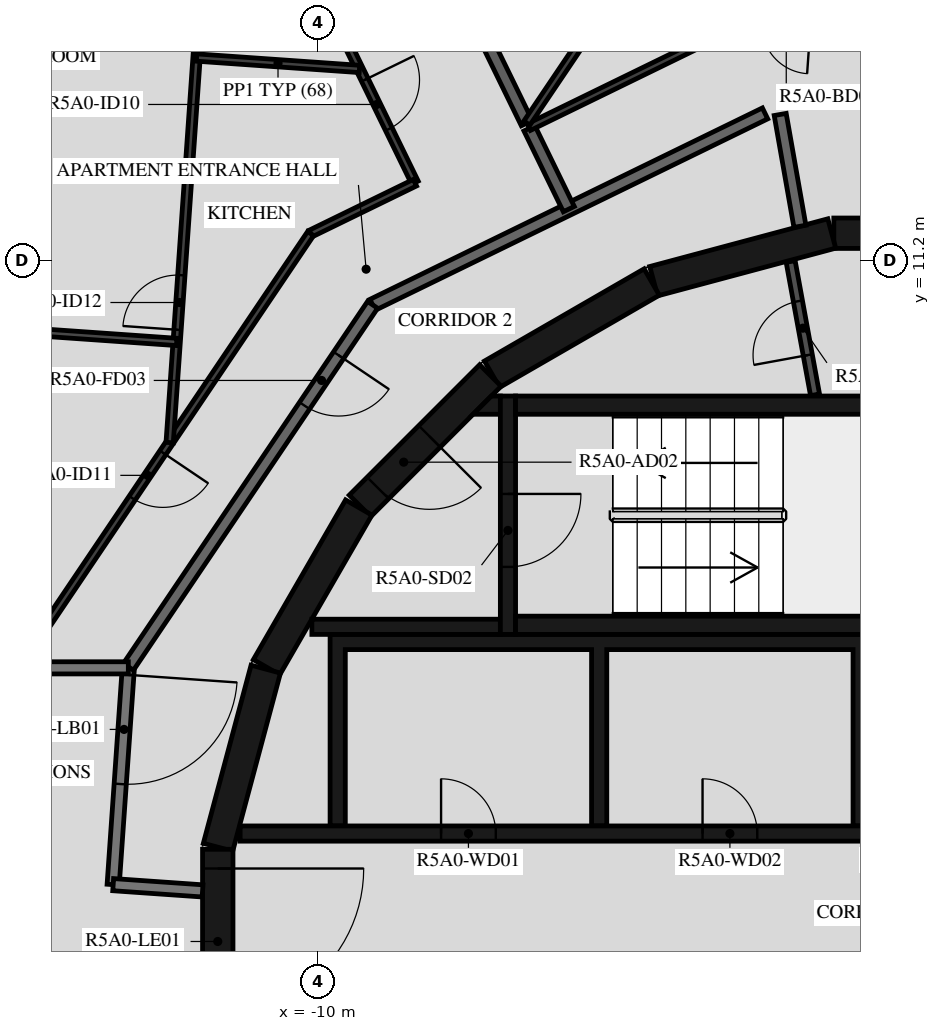
"""IFC4 building model, lengths in metres.
Left out: names, types, materials, properties, quantities, classifications, styles, units other than length and angle.
Written with IfcOpenShell. Run it as: python <this file> out.ifc"""

import sys

from ifc_helpers import new_model, si_unit, direction, frame, frame_2d, origin, place, context, subcontext, project, spatial, polyline, rectangle, outline, extrude, element, fill, save


model = new_model("IFC4")
c1 = context("Model", 3, precision=1e-05, world=origin(), true_north=direction((0.0, 1.0)))
c2 = subcontext(c1, "Body", "Model", "MODEL_VIEW")
j1 = project(units=[si_unit("LENGTHUNIT", "METRE"), si_unit("PLANEANGLEUNIT", "RADIAN")], contexts=[c1])
p1 = place(None, origin())
s1 = spatial("IfcSite", under=j1, at=p1, CompositionType="ELEMENT")
p2 = place(p1, origin())
s2 = spatial("IfcBuilding", under=s1, at=p2, CompositionType="ELEMENT")
p3 = place(p2, frame((0.0, 0.0, 188.4)))
s3 = spatial("IfcBuildingStorey", under=s2, at=p3, CompositionType="ELEMENT", Elevation=188.4)
for number, where, z_axis, x_axis in (
    (1, (1.516, 11.647, 0.0), (0.0, 0.0, 1.0), (-1.0, 0.0, 0.0)),
    (2, (-1.55, 11.643, 0.0), (0.0, 0.0, 1.0), (-0.966, -0.259, 0.0)),
    (3, (-4.51, 10.845, 0.0), (0.0, 0.0, 1.0), (-0.866, -0.5, 0.0)),
):
    element("IfcWall", number, at=place(p3, frame(where, z_axis=z_axis, x_axis=x_axis)), inside=s3, PredefinedType="SHEAR", context=c2, shape_type="SweptSolid", body=[
        extrude(rectangle(XDim=3.033, YDim=0.5, at=frame_2d((1.516, 0.0))), origin(), (0.0, 0.0, 1.0), 3.12),
    ])
p4 = place(p3, frame((-7.164, 9.308, 0.0), z_axis=(0.0, 0.0, 1.0), x_axis=(-0.707106781187, -0.707106781187, 0.0)))
e4 = element("IfcWall", 4, at=p4, inside=s3, PredefinedType="SHEAR", context=c2, shape_type="SweptSolid", body=[
    extrude(rectangle(XDim=3.032, YDim=0.5, at=frame_2d((1.516, 0.0))), origin(), (0.0, 0.0, 1.0), 3.12),
])
p5 = place(p4, frame((1.416, 0.0, 0.0)))
e5 = element("IfcOpeningElement", 5, at=p5, cuts=e4, PredefinedType="OPENING", context=c2, shape_type="SweptSolid", body=[
    extrude(rectangle(XDim=1.2, YDim=2.1, at=frame_2d((0.6, 1.05))), frame((0.0, 0.26, 0.0), z_axis=(0.0, -1.0, 0.0), x_axis=(1.0, 0.0, 0.0)), (0.0, 0.0, 1.0), 0.52),
])
for number, where, z_axis, x_axis in (
    (6, (-9.329, 7.137, 0.0), (0.0, 0.0, 1.0), (-0.5, -0.866, 0.0)),
    (7, (-10.858, 4.479, 0.0), (0.0, 0.0, 1.0), (-0.259, -0.966, 0.0)),
):
    element("IfcWall", number, at=place(p3, frame(where, z_axis=z_axis, x_axis=x_axis)), inside=s3, PredefinedType="SHEAR", context=c2, shape_type="SweptSolid", body=[
        extrude(rectangle(XDim=3.033, YDim=0.5, at=frame_2d((1.516, 0.0))), origin(), (0.0, 0.0, 1.0), 3.12),
    ])
p6 = place(p3, frame((-11.647, 1.516, 0.0), z_axis=(0.0, 0.0, 1.0), x_axis=(0.0, -1.0, 0.0)))
e8 = element("IfcWall", 8, at=p6, inside=s3, PredefinedType="SHEAR", context=c2, shape_type="SweptSolid", body=[
    extrude(rectangle(XDim=3.033, YDim=0.5, at=frame_2d((1.516, 0.0))), origin(), (0.0, 0.0, 1.0), 3.12),
])
p7 = place(p6, frame((0.316, 0.0, 0.0)))
e9 = element("IfcOpeningElement", 9, at=p7, cuts=e8, PredefinedType="OPENING", context=c2, shape_type="SweptSolid", body=[
    extrude(rectangle(XDim=2.4, YDim=2.1, at=frame_2d((1.2, 1.05))), frame((0.0, 0.26, 0.0), z_axis=(0.0, -1.0, 0.0), x_axis=(1.0, 0.0, 0.0)), (0.0, 0.0, 1.0), 0.52),
])
for number, where, z_axis, x_axis in (
    (10, (-6.75, 5.2, 0.0), (0.0, 0.0, 1.0), (1.0, 0.0, 0.0)),
    (11, (-6.75, 8.82, 0.0), (0.0, 0.0, 1.0), (1.0, 0.0, 0.0)),
):
    element("IfcWall", number, at=place(p3, frame(where, z_axis=z_axis, x_axis=x_axis)), inside=s3, PredefinedType="SHEAR", context=c2, shape_type="SweptSolid", body=[
        extrude(rectangle(XDim=6.75, YDim=0.3, at=frame_2d((3.375, 0.0))), origin(), (0.0, 0.0, 1.0), 3.12),
    ])
p8 = place(p3, frame((-6.875, 8.97, 0.0), z_axis=(0.0, 0.0, 1.0), x_axis=(0.0, -1.0, 0.0)))
e12 = element("IfcWall", 12, at=p8, inside=s3, PredefinedType="SHEAR", context=c2, shape_type="SweptSolid", body=[
    extrude(rectangle(XDim=3.92, YDim=0.25, at=frame_2d((1.96, 0.0))), origin(), (0.0, 0.0, 1.0), 3.12),
])
p9 = place(p8, frame((1.61, 0.0, 0.0)))
e13 = element("IfcOpeningElement", 13, at=p9, cuts=e12, PredefinedType="OPENING", context=c2, shape_type="SweptSolid", body=[
    extrude(rectangle(XDim=1.2, YDim=2.1, at=frame_2d((0.6, 1.05))), frame((0.0, 0.135, 0.0), z_axis=(0.0, -1.0, 0.0), x_axis=(1.0, 0.0, 0.0)), (0.0, 0.0, 1.0), 0.27),
])
p10 = place(p3, frame((-7.0, 5.175, 0.0), z_axis=(0.0, 0.0, 1.0), x_axis=(-1.0, 0.0, 0.0)))
e14 = element("IfcWall", 14, at=p10, inside=s3, PredefinedType="SHEAR", context=c2, shape_type="SweptSolid", body=[
    extrude(rectangle(XDim=3.1, YDim=0.25, at=frame_2d((1.55, 0.0))), origin(), (0.0, 0.0, 1.0), 3.12),
])
p11 = place(p3, origin())
e15 = element("IfcWall", 15, at=p11, inside=s3, PredefinedType="SHEAR", context=c2, shape_type="SweptSolid", body=[
    extrude(outline(polyline([(-7.148, 8.97), (-7.0, 8.97), (-7.0, 8.67), (-7.448, 8.67), (-7.148, 8.97)])), origin(), (0.0, 0.0, 1.0), 3.12),
])
p12 = place(p3, origin())
e16 = element("IfcWall", 16, at=p12, inside=s3, PredefinedType="SHEAR", context=c2, shape_type="SweptSolid", body=[
    extrude(outline(polyline([(-9.55, 4.8), (-5.5, 4.8), (-5.5, 1.9), (-5.25, 1.9), (-5.25, 4.8), (-1.2, 4.8), (-1.2, 1.9), (-0.95, 1.9), (-0.95, 4.8), (0.95, 4.8), (0.95, 1.9), (1.2, 1.9), (1.2, 4.8), (3.1, 4.8), (3.1, 1.9), (3.35, 1.9), (3.35, 4.8), (5.25, 4.8), (5.25, 1.9), (5.5, 1.9), (5.5, 4.8), (7.4, 4.8), (7.4, 1.9), (7.65, 1.9), (7.65, 4.8), (9.55, 4.8), (9.55, 1.9), (9.8, 1.9), (9.8, 4.8), (9.8, 5.05), (-9.8, 5.05), (-9.8, 4.8), (-9.8, 1.9), (-9.55, 1.9), (-9.55, 4.8)])), origin(), (0.0, 0.0, 1.0), 3.12),
])
p13 = place(p3, frame((-11.28, 1.775, 0.0), z_axis=(0.0, 0.0, 1.0), x_axis=(1.0, 0.0, 0.0)))
e17 = element("IfcWall", 17, at=p13, inside=s3, PredefinedType="SHEAR", context=c2, shape_type="SweptSolid", body=[
    extrude(rectangle(XDim=14.38, YDim=0.25, at=frame_2d((7.19, 0.0))), origin(), (0.0, 0.0, 1.0), 3.12),
])
p14 = place(p13, frame((10.73, 0.0, 0.0)))
e18 = element("IfcOpeningElement", 18, at=p14, cuts=e17, PredefinedType="OPENING", context=c2, shape_type="SweptSolid", body=[
    extrude(rectangle(XDim=1.1, YDim=2.1, at=frame_2d((0.55, 1.05))), frame((0.0, 0.135, 0.0), z_axis=(0.0, -1.0, 0.0), x_axis=(1.0, 0.0, 0.0)), (0.0, 0.0, 1.0), 0.27),
])
p15 = place(p13, frame((12.88, 0.0, 0.0)))
e19 = element("IfcOpeningElement", 19, at=p15, cuts=e17, PredefinedType="OPENING", context=c2, shape_type="SweptSolid", body=[
    extrude(rectangle(XDim=1.1, YDim=2.1, at=frame_2d((0.55, 1.05))), frame((0.0, 0.135, 0.0), z_axis=(0.0, -1.0, 0.0), x_axis=(1.0, 0.0, 0.0)), (0.0, 0.0, 1.0), 0.27),
])
p16 = place(p13, frame((3.305, 0.0, 0.0)))
e20 = element("IfcOpeningElement", 20, at=p16, cuts=e17, PredefinedType="OPENING", context=c2, shape_type="SweptSolid", body=[
    extrude(rectangle(XDim=0.9, YDim=2.1, at=frame_2d((0.45, 1.05))), frame((0.0, 0.135, 0.0), z_axis=(0.0, -1.0, 0.0), x_axis=(1.0, 0.0, 0.0)), (0.0, 0.0, 1.0), 0.27),
])
p17 = place(p13, frame((7.605, 0.0, 0.0)))
e21 = element("IfcOpeningElement", 21, at=p17, cuts=e17, PredefinedType="OPENING", context=c2, shape_type="SweptSolid", body=[
    extrude(rectangle(XDim=0.9, YDim=2.1, at=frame_2d((0.45, 1.05))), frame((0.0, 0.135, 0.0), z_axis=(0.0, -1.0, 0.0), x_axis=(1.0, 0.0, 0.0)), (0.0, 0.0, 1.0), 0.27),
])
p18 = place(p3, frame((-1.825, 8.99, 0.0), z_axis=(0.0, 0.0, 1.0), x_axis=(-0.179955206115, 0.983674805915, 0.0)))
e22 = element("IfcWall", 22, at=p18, inside=s3, PredefinedType="PARTITIONING", context=c2, shape_type="SweptSolid", body=[
    extrude(rectangle(XDim=2.229, YDim=0.15, at=frame_2d((1.115, 0.0))), origin(), (0.0, 0.0, 1.0), 3.12),
])
p19 = place(p18, frame((0.665, 0.0, 0.0)))
e23 = element("IfcOpeningElement", 23, at=p19, cuts=e22, PredefinedType="OPENING", context=c2, shape_type="SweptSolid", body=[
    extrude(rectangle(XDim=0.9, YDim=2.1, at=frame_2d((0.45, 1.05))), frame((0.0, 0.085, 0.0), z_axis=(0.0, -1.0, 0.0), x_axis=(1.0, 0.0, 0.0)), (0.0, 0.0, 1.0), 0.17),
])
p20 = place(p3, frame((-13.118, 4.5, 0.0), z_axis=(0.0, 0.0, 1.0), x_axis=(-0.069746872611, -0.99756472159, 0.0)))
e24 = element("IfcWall", 24, at=p20, inside=s3, PredefinedType="STANDARD", context=c2, shape_type="SweptSolid", body=[
    extrude(rectangle(XDim=3.574, YDim=0.2, at=frame_2d((1.787, 0.0))), origin(), (0.0, 0.0, 1.0), 3.12),
])
p21 = place(p20, frame((0.115, 0.0, 0.0)))
e25 = element("IfcOpeningElement", 25, at=p21, cuts=e24, PredefinedType="OPENING", context=c2, shape_type="SweptSolid", body=[
    extrude(rectangle(XDim=1.8, YDim=2.1, at=frame_2d((0.9, 1.05))), frame((0.0, 0.11, 0.0), z_axis=(0.0, -1.0, 0.0), x_axis=(1.0, 0.0, 0.0)), (0.0, 0.0, 1.0), 0.22),
])
p22 = place(p3, frame((-13.367, 0.935, 0.0), z_axis=(0.0, 0.0, 1.0), x_axis=(0.997553656289, -0.069904955655, 0.0)))
e26 = element("IfcWall", 26, at=p22, inside=s3, PredefinedType="STANDARD", context=c2, shape_type="SweptSolid", body=[
    extrude(rectangle(XDim=1.474, YDim=0.2, at=frame_2d((0.737, 0.0))), origin(), (0.0, 0.0, 1.0), 3.12),
])
p23 = place(p3, frame((-2.074, 11.761, 0.0), z_axis=(0.0, 0.0, 1.0), x_axis=(-0.173740587112, 0.984791454263, 0.0)))
e27 = element("IfcWall", 27, at=p23, inside=s3, PredefinedType="STANDARD", context=c2, shape_type="SweptSolid", body=[
    extrude(rectangle(XDim=1.867, YDim=0.2, at=frame_2d((0.934, 0.0))), origin(), (0.0, 0.0, 1.0), 3.12),
])
p24 = place(p3, frame((-2.647, 13.618, 0.0), z_axis=(0.0, 0.0, 1.0), x_axis=(-0.898796543751, -0.438366026218, 0.0)))
e28 = element("IfcWall", 28, at=p24, inside=s3, PredefinedType="STANDARD", context=c2, shape_type="SweptSolid", body=[
    extrude(rectangle(XDim=7.181, YDim=0.2, at=frame_2d((3.591, 0.0))), origin(), (0.0, 0.0, 1.0), 3.12),
])
p25 = place(p3, frame((-9.101, 10.47, 0.0), z_axis=(0.0, 0.0, 1.0), x_axis=(-0.559195469534, -0.829035841718, 0.0)))
e29 = element("IfcWall", 29, at=p25, inside=s3, PredefinedType="STANDARD", context=c2, shape_type="SweptSolid", body=[
    extrude(rectangle(XDim=7.181, YDim=0.2, at=frame_2d((3.591, 0.0))), origin(), (0.0, 0.0, 1.0), 3.12),
])
p26 = place(p25, frame((1.0, 0.0, 0.0)))
e30 = element("IfcOpeningElement", 30, at=p26, cuts=e29, PredefinedType="OPENING", context=c2, shape_type="SweptSolid", body=[
    extrude(rectangle(XDim=1.0, YDim=2.1, at=frame_2d((0.5, 1.05))), frame((0.0, 0.11, 0.0), z_axis=(0.0, -1.0, 0.0), x_axis=(1.0, 0.0, 0.0)), (0.0, 0.0, 1.0), 0.22),
])
p27 = place(p3, frame((-13.118, 4.5, 0.0), z_axis=(0.0, 0.0, 1.0), x_axis=(-1.0, 0.0, 0.0)))
e31 = element("IfcWall", 31, at=p27, inside=s3, PredefinedType="STANDARD", context=c2, shape_type="SweptSolid", body=[
    extrude(rectangle(XDim=4.782, YDim=0.2, at=frame_2d((2.391, 0.0))), origin(), (0.0, 0.0, 1.0), 3.12),
])
p28 = place(p3, frame((-6.522, 13.373, 0.0), z_axis=(0.0, 0.0, 1.0), x_axis=(0.438277270821, -0.8988398266, 0.0)))
e32 = element("IfcWall", 32, at=p28, inside=s3, PredefinedType="STANDARD", context=c2, shape_type="SweptSolid", body=[
    extrude(rectangle(XDim=1.479, YDim=0.2, at=frame_2d((0.74, 0.0))), origin(), (0.0, 0.0, 1.0), 3.12),
])
p29 = place(p3, frame((-8.219, 16.851, 0.0), z_axis=(0.0, 0.0, 1.0), x_axis=(0.438291091101, -0.898833087654, 0.0)))
e33 = element("IfcWall", 33, at=p29, inside=s3, PredefinedType="STANDARD", context=c2, shape_type="SweptSolid", body=[
    extrude(rectangle(XDim=3.774, YDim=0.2, at=frame_2d((1.887, 0.0))), origin(), (0.0, 0.0, 1.0), 3.12),
])
p30 = place(p3, frame((5.022, 14.585, 0.0), z_axis=(0.0, 0.0, 1.0), x_axis=(-0.997565118395, 0.069741197017, 0.0)))
e34 = element("IfcWall", 34, at=p30, inside=s3, PredefinedType="PARTITIONING", context=c2, shape_type="SweptSolid", body=[
    extrude(rectangle(XDim=7.985, YDim=0.12, at=frame_2d((3.993, 0.0))), origin(), (0.0, 0.0, 1.0), 3.12),
])
p31 = place(p30, frame((2.875, 0.0, 0.0)))
e35 = element("IfcOpeningElement", 35, at=p31, cuts=e34, PredefinedType="OPENING", context=c2, shape_type="SweptSolid", body=[
    extrude(rectangle(XDim=0.9, YDim=2.1, at=frame_2d((0.45, 1.05))), frame((0.0, 0.07, 0.0), z_axis=(0.0, -1.0, 0.0), x_axis=(1.0, 0.0, 0.0)), (0.0, 0.0, 1.0), 0.14),
])
p32 = place(p30, frame((6.938, 0.0, 0.0)))
e36 = element("IfcOpeningElement", 36, at=p32, cuts=e34, PredefinedType="OPENING", context=c2, shape_type="SweptSolid", body=[
    extrude(rectangle(XDim=0.8, YDim=2.1, at=frame_2d((0.4, 1.05))), frame((0.0, 0.07, 0.0), z_axis=(0.0, -1.0, 0.0), x_axis=(1.0, 0.0, 0.0)), (0.0, 0.0, 1.0), 0.14),
])
p33 = place(p3, frame((-2.943, 15.142, 0.0), z_axis=(0.0, 0.0, 1.0), x_axis=(-0.89881075705, -0.438336883014, 0.0)))
e37 = element("IfcWall", 37, at=p33, inside=s3, PredefinedType="PARTITIONING", context=c2, shape_type="SweptSolid", body=[
    extrude(rectangle(XDim=3.992, YDim=0.12, at=frame_2d((1.996, 0.0))), origin(), (0.0, 0.0, 1.0), 3.12),
])
p34 = place(p3, frame((-3.939, 17.35, 0.0), z_axis=(0.0, 0.0, 1.0), x_axis=(-0.559193216274, -0.829037361566, 0.0)))
e38 = element("IfcWall", 38, at=p34, inside=s3, PredefinedType="PARTITIONING", context=c2, shape_type="SweptSolid", body=[
    extrude(rectangle(XDim=4.694, YDim=0.12, at=frame_2d((2.347, 0.0))), origin(), (0.0, 0.0, 1.0), 3.12),
])
p35 = place(p3, frame((-10.5, 16.775, 0.0), z_axis=(0.0, 0.0, 1.0), x_axis=(0.438345136783, -0.898806731761, 0.0)))
e39 = element("IfcWall", 39, at=p35, inside=s3, PredefinedType="PARTITIONING", context=c2, shape_type="SweptSolid", body=[
    extrude(rectangle(XDim=4.78, YDim=0.12, at=frame_2d((2.39, 0.0))), origin(), (0.0, 0.0, 1.0), 3.12),
])
p36 = place(p35, frame((0.7, 0.0, 0.0)))
e40 = element("IfcOpeningElement", 40, at=p36, cuts=e39, PredefinedType="OPENING", context=c2, shape_type="SweptSolid", body=[
    extrude(rectangle(XDim=0.8, YDim=2.1, at=frame_2d((0.4, 1.05))), frame((0.0, 0.07, 0.0), z_axis=(0.0, -1.0, 0.0), x_axis=(1.0, 0.0, 0.0)), (0.0, 0.0, 1.0), 0.14),
])
p37 = place(p35, frame((2.899, 0.0, 0.0)))
e41 = element("IfcOpeningElement", 41, at=p37, cuts=e39, PredefinedType="OPENING", context=c2, shape_type="SweptSolid", body=[
    extrude(rectangle(XDim=0.9, YDim=2.1, at=frame_2d((0.45, 1.05))), frame((0.0, 0.07, 0.0), z_axis=(0.0, -1.0, 0.0), x_axis=(1.0, 0.0, 0.0)), (0.0, 0.0, 1.0), 0.14),
])
p38 = place(p3, frame((-8.405, 12.479, 0.0), z_axis=(0.0, 0.0, 1.0), x_axis=(-0.898784427692, -0.438390867307, 0.0)))
e42 = element("IfcWall", 42, at=p38, inside=s3, PredefinedType="PARTITIONING", context=c2, shape_type="SweptSolid", body=[
    extrude(rectangle(XDim=1.908, YDim=0.12, at=frame_2d((0.954, 0.0))), origin(), (0.0, 0.0, 1.0), 3.12),
])
p39 = place(p3, frame((-10.12, 11.642, 0.0), z_axis=(0.0, 0.0, 1.0), x_axis=(-0.55920080659, -0.829032241779, 0.0)))
e43 = element("IfcWall", 43, at=p39, inside=s3, PredefinedType="PARTITIONING", context=c2, shape_type="SweptSolid", body=[
    extrude(rectangle(XDim=7.985, YDim=0.12, at=frame_2d((3.992, 0.0))), origin(), (0.0, 0.0, 1.0), 3.12),
])
p40 = place(p39, frame((4.346, 0.0, 0.0)))
e44 = element("IfcOpeningElement", 44, at=p40, cuts=e43, PredefinedType="OPENING", context=c2, shape_type="SweptSolid", body=[
    extrude(rectangle(XDim=0.9, YDim=2.1, at=frame_2d((0.45, 1.05))), frame((0.0, 0.07, 0.0), z_axis=(0.0, -1.0, 0.0), x_axis=(1.0, 0.0, 0.0)), (0.0, 0.0, 1.0), 0.14),
])
p41 = place(p3, frame((-12.439, 8.204, 0.0), z_axis=(0.0, 0.0, 1.0), x_axis=(0.069750037523, 0.997564500303, 0.0)))
e45 = element("IfcWall", 45, at=p41, inside=s3, PredefinedType="PARTITIONING", context=c2, shape_type="SweptSolid", body=[
    extrude(rectangle(XDim=10.014, YDim=0.12, at=frame_2d((5.007, 0.0))), origin(), (0.0, 0.0, 1.0), 3.12),
])
p42 = place(p41, frame((1.859, 0.0, 0.0)))
e46 = element("IfcOpeningElement", 46, at=p42, cuts=e45, PredefinedType="OPENING", context=c2, shape_type="SweptSolid", body=[
    extrude(rectangle(XDim=0.9, YDim=2.1, at=frame_2d((0.45, 1.05))), frame((0.0, 0.07, 0.0), z_axis=(0.0, -1.0, 0.0), x_axis=(1.0, 0.0, 0.0)), (0.0, 0.0, 1.0), 0.14),
])
p43 = place(p3, frame((-11.996, 14.536, 0.0), z_axis=(0.0, 0.0, 1.0), x_axis=(0.997565991425, -0.069728708231, 0.0)))
e47 = element("IfcWall", 47, at=p43, inside=s3, PredefinedType="PARTITIONING", context=c2, shape_type="SweptSolid", body=[
    extrude(rectangle(XDim=2.686, YDim=0.12, at=frame_2d((1.343, 0.0))), origin(), (0.0, 0.0, 1.0), 3.12),
])
p44 = place(p3, frame((-17.51, 10.222, 0.0), z_axis=(0.0, 0.0, 1.0), x_axis=(0.997563184303, -0.069768856397, 0.0)))
e48 = element("IfcWall", 48, at=p44, inside=s3, PredefinedType="PARTITIONING", context=c2, shape_type="SweptSolid", body=[
    extrude(rectangle(XDim=5.2, YDim=0.12, at=frame_2d((2.6, 0.0))), origin(), (0.0, 0.0, 1.0), 2.73),
])
p45 = place(p9, origin())
e49 = element("IfcDoor", 49, at=p45, inside=s3, OperationType="SINGLE_SWING_LEFT", PredefinedType="DOOR", context=c2, shape_type="SweptSolid", body=[
    extrude(rectangle(XDim=1.2, YDim=2.1, at=frame_2d((0.6, 1.05))), frame((0.0, 0.025, 0.0), z_axis=(0.0, -1.0, 0.0), x_axis=(1.0, 0.0, 0.0)), (0.0, 0.0, 1.0), 0.05),
])
fill(e13, e49)
p46 = place(p5, origin())
e50 = element("IfcDoor", 50, at=p46, inside=s3, OperationType="SINGLE_SWING_RIGHT", PredefinedType="DOOR", context=c2, shape_type="SweptSolid", body=[
    extrude(rectangle(XDim=1.2, YDim=2.1, at=frame_2d((0.6, 1.05))), frame((0.0, 0.025, 0.0), z_axis=(0.0, -1.0, 0.0), x_axis=(1.0, 0.0, 0.0)), (0.0, 0.0, 1.0), 0.05),
])
fill(e5, e50)
p47 = place(p7, origin())
e51 = element("IfcDoor", 51, at=p47, inside=s3, OperationType="DOUBLE_DOOR_SINGLE_SWING", PredefinedType="DOOR", context=c2, shape_type="SweptSolid", body=[
    extrude(rectangle(XDim=2.4, YDim=2.1, at=frame_2d((1.2, 1.05))), frame((0.0, 0.025, 0.0), z_axis=(0.0, -1.0, 0.0), x_axis=(1.0, 0.0, 0.0)), (0.0, 0.0, 1.0), 0.05),
])
fill(e9, e51)
p48 = place(p16, origin())
e52 = element("IfcDoor", 52, at=p48, inside=s3, OperationType="SINGLE_SWING_LEFT", PredefinedType="DOOR", context=c2, shape_type="SweptSolid", body=[
    extrude(rectangle(XDim=0.9, YDim=2.1, at=frame_2d((0.45, 1.05))), frame((0.0, 0.025, 0.0), z_axis=(0.0, -1.0, 0.0), x_axis=(1.0, 0.0, 0.0)), (0.0, 0.0, 1.0), 0.05),
])
fill(e20, e52)
p49 = place(p17, origin())
e53 = element("IfcDoor", 53, at=p49, inside=s3, OperationType="SINGLE_SWING_RIGHT", PredefinedType="DOOR", context=c2, shape_type="SweptSolid", body=[
    extrude(rectangle(XDim=0.9, YDim=2.1, at=frame_2d((0.45, 1.05))), frame((0.0, 0.025, 0.0), z_axis=(0.0, -1.0, 0.0), x_axis=(1.0, 0.0, 0.0)), (0.0, 0.0, 1.0), 0.05),
])
fill(e21, e53)
p50 = place(p19, origin())
e54 = element("IfcDoor", 54, at=p50, inside=s3, OperationType="SINGLE_SWING_LEFT", PredefinedType="DOOR", context=c2, shape_type="SweptSolid", body=[
    extrude(rectangle(XDim=0.9, YDim=2.1, at=frame_2d((0.45, 1.05))), frame((0.0, 0.025, 0.0), z_axis=(0.0, -1.0, 0.0), x_axis=(1.0, 0.0, 0.0)), (0.0, 0.0, 1.0), 0.05),
])
fill(e23, e54)
p51 = place(p26, origin())
e55 = element("IfcDoor", 55, at=p51, inside=s3, OperationType="SINGLE_SWING_LEFT", PredefinedType="DOOR", context=c2, shape_type="SweptSolid", body=[
    extrude(rectangle(XDim=1.0, YDim=2.1, at=frame_2d((0.5, 1.05))), frame((0.0, 0.025, 0.0), z_axis=(0.0, -1.0, 0.0), x_axis=(1.0, 0.0, 0.0)), (0.0, 0.0, 1.0), 0.05),
])
fill(e30, e55)
p52 = place(p37, origin())
e56 = element("IfcDoor", 56, at=p52, inside=s3, OperationType="SINGLE_SWING_LEFT", PredefinedType="DOOR", context=c2, shape_type="SweptSolid", body=[
    extrude(rectangle(XDim=0.9, YDim=2.1, at=frame_2d((0.45, 1.05))), frame((0.0, 0.025, 0.0), z_axis=(0.0, -1.0, 0.0), x_axis=(1.0, 0.0, 0.0)), (0.0, 0.0, 1.0), 0.05),
])
fill(e41, e56)
p53 = place(p40, origin())
e57 = element("IfcDoor", 57, at=p53, inside=s3, OperationType="SINGLE_SWING_LEFT", PredefinedType="DOOR", context=c2, shape_type="SweptSolid", body=[
    extrude(rectangle(XDim=0.9, YDim=2.1, at=frame_2d((0.45, 1.05))), frame((0.0, 0.025, 0.0), z_axis=(0.0, -1.0, 0.0), x_axis=(1.0, 0.0, 0.0)), (0.0, 0.0, 1.0), 0.05),
])
fill(e44, e57)
p54 = place(p42, origin())
e58 = element("IfcDoor", 58, at=p54, inside=s3, OperationType="SINGLE_SWING_LEFT", PredefinedType="DOOR", context=c2, shape_type="SweptSolid", body=[
    extrude(rectangle(XDim=0.9, YDim=2.1, at=frame_2d((0.45, 1.05))), frame((0.0, 0.025, 0.0), z_axis=(0.0, -1.0, 0.0), x_axis=(1.0, 0.0, 0.0)), (0.0, 0.0, 1.0), 0.05),
])
fill(e46, e58)
p55 = place(p21, origin())
e59 = element("IfcDoor", 59, at=p55, inside=s3, OperationType="DOUBLE_DOOR_SINGLE_SWING", PredefinedType="DOOR", context=c2, shape_type="SweptSolid", body=[
    extrude(rectangle(XDim=1.8, YDim=2.1, at=frame_2d((0.9, 1.05))), frame((0.0, 0.025, 0.0), z_axis=(0.0, -1.0, 0.0), x_axis=(1.0, 0.0, 0.0)), (0.0, 0.0, 1.0), 0.05),
])
fill(e25, e59)
save(model, sys.argv[1])
